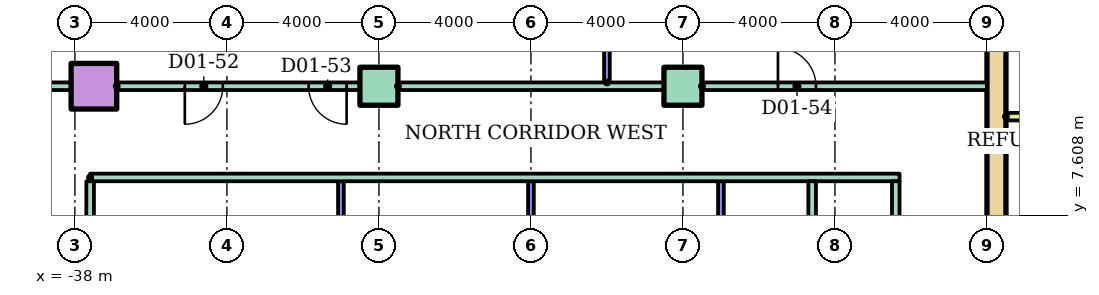
"""IFC4 building model, lengths in metres.
Left out: names, types, materials, properties, quantities, classifications, styles, units other than length and angle.
Written with IfcOpenShell. Run it as: python <this file> out.ifc"""

import sys

from ifc_helpers import new_model, si_unit, direction, frame, frame_2d, origin, origin_2d, place, context, subcontext, project, spatial, rectangle, hollow_rectangle, extrude, element, fill, save


model = new_model("IFC4")
c1 = context("Model", 3, precision=1e-05, world=origin(), true_north=direction((0.0, 1.0)))
c2 = subcontext(c1, "Body", "Model", "MODEL_VIEW")
j1 = project(units=[si_unit("LENGTHUNIT", "METRE"), si_unit("PLANEANGLEUNIT", "RADIAN")], contexts=[c1])
p1 = place(None, origin())
s1 = spatial("IfcSite", under=j1, at=p1, CompositionType="ELEMENT")
p2 = place(p1, origin())
s2 = spatial("IfcBuilding", under=s1, at=p2, CompositionType="ELEMENT")
p3 = place(p2, frame((0.0, 0.0, 6.0)))
s3 = spatial("IfcBuildingStorey", under=s2, at=p3, CompositionType="ELEMENT", Elevation=6.0)
p4 = place(p3, frame((-37.5, 11.0, 0.0)))
e1 = element("IfcColumn", 1, at=p4, inside=s3, PredefinedType="COLUMN", context=c2, shape_type="SweptSolid", body=[
    extrude(hollow_rectangle(XDim=1.2, YDim=1.2, WallThickness=0.06, at=origin_2d()), origin(), (0.0, 0.0, 1.0), 4.0),
])
for number, where in (
    (2, (-30.0, 11.0, 0.0)),
    (3, (-22.0, 11.0, 0.0)),
):
    element("IfcColumn", number, at=place(p3, frame(where)), inside=s3, PredefinedType="COLUMN", context=c2, shape_type="SweptSolid", body=[
        extrude(rectangle(XDim=1.0, YDim=1.0, at=origin_2d()), origin(), (0.0, 0.0, 1.0), 4.0),
    ])
p5 = place(p3, frame((-13.75, 3.0, 0.0), z_axis=(0.0, 0.0, 1.0), x_axis=(0.0, 1.0, 0.0)))
e4 = element("IfcWall", 4, at=p5, inside=s3, PredefinedType="SHEAR", context=c2, shape_type="SweptSolid", body=[
    extrude(rectangle(XDim=17.0, YDim=0.5, at=frame_2d((8.5, 0.0))), origin(), (0.0, 0.0, 1.0), 3.7),
])
p6 = place(p3, frame((-13.5, 10.2, 0.0)))
e5 = element("IfcWall", 5, at=p6, inside=s3, PredefinedType="PARTITIONING", context=c2, shape_type="SweptSolid", body=[
    extrude(rectangle(XDim=3.9, YDim=0.2, at=frame_2d((1.95, 0.0))), origin(), (0.0, 0.0, 1.0), 3.7),
])
p7 = place(p3, frame((-37.6, 8.6, 0.0)))
e6 = element("IfcWall", 6, at=p7, inside=s3, PredefinedType="PARTITIONING", context=c2, shape_type="SweptSolid", body=[
    extrude(rectangle(XDim=21.3, YDim=0.2, at=frame_2d((10.65, 0.0))), origin(), (0.0, 0.0, 1.0), 3.7),
])
p8 = place(p3, frame((-39.6, 11.0, 0.0)))
e7 = element("IfcWall", 7, at=p8, inside=s3, PredefinedType="PARTITIONING", context=c2, shape_type="SweptSolid", body=[
    extrude(rectangle(XDim=1.5, YDim=0.2, at=frame_2d((0.75, 0.0))), origin(), (0.0, 0.0, 1.0), 3.7),
])
p9 = place(p3, frame((-36.9, 11.0, 0.0)))
e8 = element("IfcWall", 8, at=p9, inside=s3, PredefinedType="PARTITIONING", context=c2, shape_type="SweptSolid", body=[
    extrude(rectangle(XDim=6.4, YDim=0.2, at=frame_2d((3.2, 0.0))), origin(), (0.0, 0.0, 1.0), 3.7),
])
p10 = place(p9, frame((1.792, 0.0, 0.0)))
e9 = element("IfcOpeningElement", 9, at=p10, cuts=e8, PredefinedType="OPENING", context=c2, shape_type="SweptSolid", body=[
    extrude(rectangle(XDim=1.0, YDim=2.1, at=frame_2d((0.5, 1.05))), frame((0.0, 0.11, 0.0), z_axis=(0.0, -1.0, 0.0), x_axis=(1.0, 0.0, 0.0)), (0.0, 0.0, 1.0), 0.22),
])
p11 = place(p9, frame((5.05, 0.0, 0.0)))
e10 = element("IfcOpeningElement", 10, at=p11, cuts=e8, PredefinedType="OPENING", context=c2, shape_type="SweptSolid", body=[
    extrude(rectangle(XDim=1.0, YDim=2.1, at=frame_2d((0.5, 1.05))), frame((0.0, 0.11, 0.0), z_axis=(0.0, -1.0, 0.0), x_axis=(1.0, 0.0, 0.0)), (0.0, 0.0, 1.0), 0.22),
])
p12 = place(p3, frame((-29.5, 11.0, 0.0)))
e11 = element("IfcWall", 11, at=p12, inside=s3, PredefinedType="PARTITIONING", context=c2, shape_type="SweptSolid", body=[
    extrude(rectangle(XDim=7.0, YDim=0.2, at=frame_2d((3.5, 0.0))), origin(), (0.0, 0.0, 1.0), 3.7),
])
p13 = place(p3, frame((-21.5, 11.0, 0.0)))
e12 = element("IfcWall", 12, at=p13, inside=s3, PredefinedType="PARTITIONING", context=c2, shape_type="SweptSolid", body=[
    extrude(rectangle(XDim=7.5, YDim=0.2, at=frame_2d((3.75, 0.0))), origin(), (0.0, 0.0, 1.0), 3.7),
])
p14 = place(p13, frame((2.0, 0.0, 0.0)))
e13 = element("IfcOpeningElement", 13, at=p14, cuts=e12, PredefinedType="OPENING", context=c2, shape_type="SweptSolid", body=[
    extrude(rectangle(XDim=1.0, YDim=2.1, at=frame_2d((0.5, 1.05))), frame((0.0, 0.11, 0.0), z_axis=(0.0, -1.0, 0.0), x_axis=(1.0, 0.0, 0.0)), (0.0, 0.0, 1.0), 0.22),
])
p15 = place(p3, frame((-37.6, 2.6, 0.0), z_axis=(0.0, 0.0, 1.0), x_axis=(0.0, 1.0, 0.0)))
e14 = element("IfcWall", 14, at=p15, inside=s3, PredefinedType="PARTITIONING", context=c2, shape_type="SweptSolid", body=[
    extrude(rectangle(XDim=5.9, YDim=0.2, at=frame_2d((2.95, 0.0))), origin(), (0.0, 0.0, 1.0), 3.7),
])
p16 = place(p15, frame((1.9, 0.0, 0.0)))
e15 = element("IfcOpeningElement", 15, at=p16, cuts=e14, PredefinedType="OPENING", context=c2, shape_type="SweptSolid", body=[
    extrude(rectangle(XDim=1.0, YDim=2.1, at=frame_2d((0.5, 1.05))), frame((0.0, 0.11, 0.0), z_axis=(0.0, -1.0, 0.0), x_axis=(1.0, 0.0, 0.0)), (0.0, 0.0, 1.0), 0.22),
])
for number, where, z_axis, x_axis in (
    (16, (-31.0, 1.5, 0.0), (0.0, 0.0, 1.0), (0.0, 1.0, 0.0)),
    (17, (-26.0, 1.5, 0.0), (0.0, 0.0, 1.0), (0.0, 1.0, 0.0)),
):
    element("IfcWall", number, at=place(p3, frame(where, z_axis=z_axis, x_axis=x_axis)), inside=s3, PredefinedType="PARTITIONING", context=c2, shape_type="SweptSolid", body=[
        extrude(rectangle(XDim=7.0, YDim=0.15, at=frame_2d((3.5, 0.0))), origin(), (0.0, 0.0, 1.0), 3.7),
    ])
p17 = place(p3, frame((-24.0, 11.1, 0.0), z_axis=(0.0, 0.0, 1.0), x_axis=(0.0, 1.0, 0.0)))
e18 = element("IfcWall", 18, at=p17, inside=s3, PredefinedType="PARTITIONING", context=c2, shape_type="SweptSolid", body=[
    extrude(rectangle(XDim=8.5, YDim=0.15, at=frame_2d((4.25, 0.0))), origin(), (0.0, 0.0, 1.0), 3.7),
])
p18 = place(p3, frame((-21.0, 1.5, 0.0), z_axis=(0.0, 0.0, 1.0), x_axis=(0.0, 1.0, 0.0)))
e19 = element("IfcWall", 19, at=p18, inside=s3, PredefinedType="PARTITIONING", context=c2, shape_type="SweptSolid", body=[
    extrude(rectangle(XDim=7.0, YDim=0.15, at=frame_2d((3.5, 0.0))), origin(), (0.0, 0.0, 1.0), 3.7),
])
for number, where, z_axis, x_axis in (
    (20, (-18.6, 1.5, 0.0), (0.0, 0.0, 1.0), (0.0, 1.0, 0.0)),
    (21, (-16.4, 1.5, 0.0), (0.0, 0.0, 1.0), (0.0, 1.0, 0.0)),
):
    element("IfcWall", number, at=place(p3, frame(where, z_axis=z_axis, x_axis=x_axis)), inside=s3, PredefinedType="PARTITIONING", context=c2, shape_type="SweptSolid", body=[
        extrude(rectangle(XDim=7.0, YDim=0.2, at=frame_2d((3.5, 0.0))), origin(), (0.0, 0.0, 1.0), 3.7),
    ])
p19 = place(p10, frame((1.0, 0.0, 0.0), z_axis=(0.0, 0.0, 1.0), x_axis=(-1.0, 0.0, 0.0)))
e22 = element("IfcDoor", 22, at=p19, inside=s3, OperationType="SINGLE_SWING_LEFT", PredefinedType="DOOR", context=c2, shape_type="SweptSolid", body=[
    extrude(rectangle(XDim=1.0, YDim=2.1, at=frame_2d((0.5, 1.05))), frame((0.0, 0.025, 0.0), z_axis=(0.0, -1.0, 0.0), x_axis=(1.0, 0.0, 0.0)), (0.0, 0.0, 1.0), 0.05),
])
fill(e9, e22)
p20 = place(p11, frame((1.0, 0.0, 0.0), z_axis=(0.0, 0.0, 1.0), x_axis=(-1.0, 0.0, 0.0)))
e23 = element("IfcDoor", 23, at=p20, inside=s3, OperationType="SINGLE_SWING_RIGHT", PredefinedType="DOOR", context=c2, shape_type="SweptSolid", body=[
    extrude(rectangle(XDim=1.0, YDim=2.1, at=frame_2d((0.5, 1.05))), frame((0.0, 0.025, 0.0), z_axis=(0.0, -1.0, 0.0), x_axis=(1.0, 0.0, 0.0)), (0.0, 0.0, 1.0), 0.05),
])
fill(e10, e23)
p21 = place(p14, origin())
e24 = element("IfcDoor", 24, at=p21, inside=s3, OperationType="SINGLE_SWING_LEFT", PredefinedType="DOOR", context=c2, shape_type="SweptSolid", body=[
    extrude(rectangle(XDim=1.0, YDim=2.1, at=frame_2d((0.5, 1.05))), frame((0.0, 0.025, 0.0), z_axis=(0.0, -1.0, 0.0), x_axis=(1.0, 0.0, 0.0)), (0.0, 0.0, 1.0), 0.05),
])
fill(e13, e24)
save(model, sys.argv[1])
